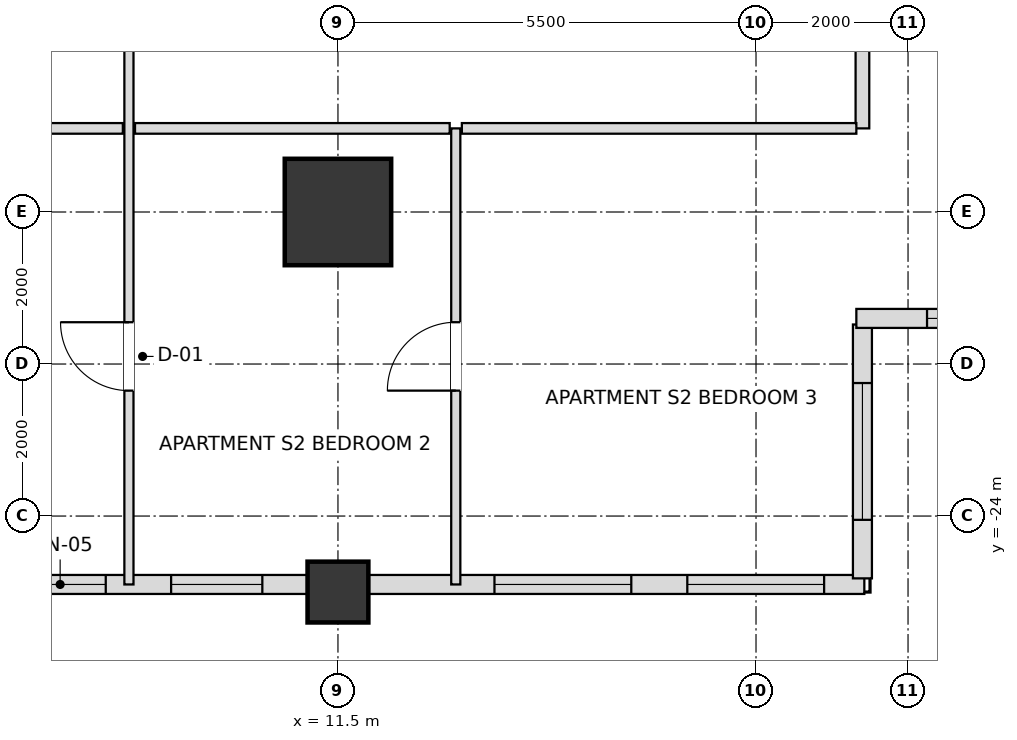
"""IFC4 building model, lengths in metres.
Left out: names, types, materials, properties, quantities, classifications, styles, units other than length and angle.
Written with IfcOpenShell. Run it as: python <this file> out.ifc"""

import sys

from ifc_helpers import new_model, si_unit, direction, frame, frame_2d, origin, origin_2d, place, context, subcontext, project, spatial, rectangle, extrude, element, fill, save


model = new_model("IFC4")
c1 = context("Model", 3, precision=1e-05, world=origin(), true_north=direction((0.0, 1.0)))
c2 = subcontext(c1, "Body", "Model", "MODEL_VIEW")
j1 = project(units=[si_unit("LENGTHUNIT", "METRE"), si_unit("PLANEANGLEUNIT", "RADIAN")], contexts=[c1])
p1 = place(None, origin())
s1 = spatial("IfcSite", under=j1, at=p1, CompositionType="ELEMENT")
p2 = place(p1, origin())
s2 = spatial("IfcBuilding", under=s1, at=p2, CompositionType="ELEMENT")
p3 = place(p2, frame((0.0, 0.0, 68.4)))
s3 = spatial("IfcBuildingStorey", under=s2, at=p3, CompositionType="ELEMENT", Elevation=68.4)
p4 = place(p3, frame((11.5, -20.0, 0.0), z_axis=(0.0, 0.0, 1.0), x_axis=(1.0, 0.0, 0.0)))
e1 = element("IfcColumn", 1, at=p4, inside=s3, PredefinedType="USERDEFINED", context=c2, shape_type="SweptSolid", body=[
    extrude(rectangle(XDim=1.4, YDim=1.4, at=origin_2d()), origin(), (0.0, 0.0, 1.0), 3.6),
])
p5 = place(p3, frame((11.5, -25.0, 0.0), z_axis=(0.0, 0.0, 1.0), x_axis=(1.0, 0.0, 0.0)))
e2 = element("IfcColumn", 2, at=p5, inside=s3, PredefinedType="COLUMN", context=c2, shape_type="SweptSolid", body=[
    extrude(rectangle(XDim=0.8, YDim=0.8, at=origin_2d()), origin(), (0.0, 0.0, 1.0), 3.6),
])
p6 = place(p3, frame((6.895, -24.9, 0.0), z_axis=(0.0, 0.0, 1.0), x_axis=(1.0, 0.0, 0.0)))
e3 = element("IfcWall", 3, at=p6, inside=s3, PredefinedType="SOLIDWALL", context=c2, shape_type="SweptSolid", body=[
    extrude(rectangle(XDim=4.21, YDim=0.25, at=frame_2d((2.105, 0.0))), origin(), (0.0, 0.0, 1.0), 2.736),
])
p7 = place(p6, frame((0.35, 0.0, 0.72)))
e4 = element("IfcOpeningElement", 4, at=p7, cuts=e3, PredefinedType="OPENING", context=c2, shape_type="SweptSolid", body=[
    extrude(rectangle(XDim=1.2, YDim=1.68, at=frame_2d((0.6, 0.84))), frame((0.0, 0.135, 0.0), z_axis=(0.0, -1.0, 0.0), x_axis=(1.0, 0.0, 0.0)), (0.0, 0.0, 1.0), 0.27),
])
p8 = place(p6, frame((2.41, 0.0, 0.72)))
e5 = element("IfcOpeningElement", 5, at=p8, cuts=e3, PredefinedType="OPENING", context=c2, shape_type="SweptSolid", body=[
    extrude(rectangle(XDim=1.2, YDim=1.68, at=frame_2d((0.6, 0.84))), frame((0.0, 0.135, 0.0), z_axis=(0.0, -1.0, 0.0), x_axis=(1.0, 0.0, 0.0)), (0.0, 0.0, 1.0), 0.27),
])
p9 = place(p3, frame((11.895, -24.9, 0.0), z_axis=(0.0, 0.0, 1.0), x_axis=(1.0, 0.0, 0.0)))
e6 = element("IfcWall", 6, at=p9, inside=s3, PredefinedType="SOLIDWALL", context=c2, shape_type="SweptSolid", body=[
    extrude(rectangle(XDim=6.53, YDim=0.25, at=frame_2d((3.265, 0.0))), origin(), (0.0, 0.0, 1.0), 2.736),
])
p10 = place(p9, frame((1.664, 0.0, 0.72)))
e7 = element("IfcOpeningElement", 7, at=p10, cuts=e6, PredefinedType="OPENING", context=c2, shape_type="SweptSolid", body=[
    extrude(rectangle(XDim=1.8, YDim=1.68, at=frame_2d((0.9, 0.84))), frame((0.0, 0.135, 0.0), z_axis=(0.0, -1.0, 0.0), x_axis=(1.0, 0.0, 0.0)), (0.0, 0.0, 1.0), 0.27),
])
p11 = place(p9, frame((4.201, 0.0, 0.72)))
e8 = element("IfcOpeningElement", 8, at=p11, cuts=e6, PredefinedType="OPENING", context=c2, shape_type="SweptSolid", body=[
    extrude(rectangle(XDim=1.8, YDim=1.68, at=frame_2d((0.9, 0.84))), frame((0.0, 0.135, 0.0), z_axis=(0.0, -1.0, 0.0), x_axis=(1.0, 0.0, 0.0)), (0.0, 0.0, 1.0), 0.27),
])
p12 = place(p3, frame((18.4, -24.82, 0.0), z_axis=(0.0, 0.0, 1.0), x_axis=(0.0, 1.0, 0.0)))
e9 = element("IfcWall", 9, at=p12, inside=s3, PredefinedType="SOLIDWALL", context=c2, shape_type="SweptSolid", body=[
    extrude(rectangle(XDim=3.34, YDim=0.25, at=frame_2d((1.67, 0.0))), origin(), (0.0, 0.0, 1.0), 2.736),
])
p13 = place(p12, frame((0.77, 0.0, 0.72)))
e10 = element("IfcOpeningElement", 10, at=p13, cuts=e9, PredefinedType="OPENING", context=c2, shape_type="SweptSolid", body=[
    extrude(rectangle(XDim=1.8, YDim=1.68, at=frame_2d((0.9, 0.84))), frame((0.0, 0.135, 0.0), z_axis=(0.0, -1.0, 0.0), x_axis=(1.0, 0.0, 0.0)), (0.0, 0.0, 1.0), 0.27),
])
p14 = place(p3, frame((18.32, -21.4, 0.0), z_axis=(0.0, 0.0, 1.0), x_axis=(1.0, 0.0, 0.0)))
e11 = element("IfcWall", 11, at=p14, inside=s3, PredefinedType="SOLIDWALL", context=c2, shape_type="SweptSolid", body=[
    extrude(rectangle(XDim=3.66, YDim=0.25, at=frame_2d((1.83, 0.0))), origin(), (0.0, 0.0, 1.0), 2.736),
])
p15 = place(p14, frame((0.93, 0.0, 0.72)))
e12 = element("IfcOpeningElement", 12, at=p15, cuts=e11, PredefinedType="OPENING", context=c2, shape_type="SweptSolid", body=[
    extrude(rectangle(XDim=1.8, YDim=1.68, at=frame_2d((0.9, 0.84))), frame((0.0, 0.135, 0.0), z_axis=(0.0, -1.0, 0.0), x_axis=(1.0, 0.0, 0.0)), (0.0, 0.0, 1.0), 0.27),
])
p16 = place(p3, frame((8.75, -24.9, 0.0), z_axis=(0.0, 0.0, 1.0), x_axis=(0.0, 1.0, 0.0)))
e13 = element("IfcWall", 13, at=p16, inside=s3, PredefinedType="PARTITIONING", context=c2, shape_type="SweptSolid", body=[
    extrude(rectangle(XDim=15.6, YDim=0.12, at=frame_2d((7.8, 0.0))), origin(), (0.0, 0.0, 1.0), 2.816),
])
p17 = place(p16, frame((10.325, 0.0, 0.0)))
e14 = element("IfcOpeningElement", 14, at=p17, cuts=e13, PredefinedType="OPENING", context=c2, shape_type="SweptSolid", body=[
    extrude(rectangle(XDim=0.95, YDim=2.1, at=frame_2d((0.475, 1.05))), frame((0.0, 0.07, 0.0), z_axis=(0.0, -1.0, 0.0), x_axis=(1.0, 0.0, 0.0)), (0.0, 0.0, 1.0), 0.14),
])
p18 = place(p16, frame((2.55, 0.0, 0.0)))
e15 = element("IfcOpeningElement", 15, at=p18, cuts=e13, PredefinedType="OPENING", context=c2, shape_type="SweptSolid", body=[
    extrude(rectangle(XDim=0.9, YDim=2.1, at=frame_2d((0.45, 1.05))), frame((0.0, 0.07, 0.0), z_axis=(0.0, -1.0, 0.0), x_axis=(1.0, 0.0, 0.0)), (0.0, 0.0, 1.0), 0.14),
])
p19 = place(p3, frame((13.05, -24.9, 0.0), z_axis=(0.0, 0.0, 1.0), x_axis=(0.0, 1.0, 0.0)))
e16 = element("IfcWall", 16, at=p19, inside=s3, PredefinedType="PARTITIONING", context=c2, shape_type="SweptSolid", body=[
    extrude(rectangle(XDim=6.0, YDim=0.12, at=frame_2d((3.0, 0.0))), origin(), (0.0, 0.0, 1.0), 2.736),
])
p20 = place(p19, frame((2.55, 0.0, 0.0)))
e17 = element("IfcOpeningElement", 17, at=p20, cuts=e16, PredefinedType="OPENING", context=c2, shape_type="SweptSolid", body=[
    extrude(rectangle(XDim=0.9, YDim=2.1, at=frame_2d((0.45, 1.05))), frame((0.0, 0.07, 0.0), z_axis=(0.0, -1.0, 0.0), x_axis=(1.0, 0.0, 0.0)), (0.0, 0.0, 1.0), 0.14),
])
p21 = place(p3, frame((18.4, -18.9, 0.0), z_axis=(0.0, 0.0, 1.0), x_axis=(0.0, 1.0, 0.0)))
e18 = element("IfcWall", 18, at=p21, inside=s3, PredefinedType="PARTITIONING", context=c2, shape_type="SweptSolid", body=[
    extrude(rectangle(XDim=9.6, YDim=0.18, at=frame_2d((4.8, 0.0))), origin(), (0.0, 0.0, 1.0), 2.736),
])
p22 = place(p3, frame((5.63, -18.9, 0.0), z_axis=(0.0, 0.0, 1.0), x_axis=(1.0, 0.0, 0.0)))
e19 = element("IfcWall", 19, at=p22, inside=s3, PredefinedType="PARTITIONING", context=c2, shape_type="SweptSolid", body=[
    extrude(rectangle(XDim=3.04, YDim=0.14, at=frame_2d((1.52, 0.0))), origin(), (0.0, 0.0, 1.0), 2.816),
])
p23 = place(p3, frame((8.83, -18.9, 0.0), z_axis=(0.0, 0.0, 1.0), x_axis=(1.0, 0.0, 0.0)))
e20 = element("IfcWall", 20, at=p23, inside=s3, PredefinedType="PARTITIONING", context=c2, shape_type="SweptSolid", body=[
    extrude(rectangle(XDim=4.14, YDim=0.14, at=frame_2d((2.07, 0.0))), origin(), (0.0, 0.0, 1.0), 2.736),
])
p24 = place(p3, frame((13.13, -18.9, 0.0), z_axis=(0.0, 0.0, 1.0), x_axis=(1.0, 0.0, 0.0)))
e21 = element("IfcWall", 21, at=p24, inside=s3, PredefinedType="PARTITIONING", context=c2, shape_type="SweptSolid", body=[
    extrude(rectangle(XDim=5.19, YDim=0.14, at=frame_2d((2.595, 0.0))), origin(), (0.0, 0.0, 1.0), 2.736),
])
p25 = place(p7, origin())
e22 = element("IfcWindow", 22, at=p25, inside=s3, PartitioningType="SINGLE_PANEL", PredefinedType="WINDOW", context=c2, shape_type="SweptSolid", body=[
    extrude(rectangle(XDim=1.2, YDim=1.68, at=frame_2d((0.6, 0.84))), frame((0.0, 0.03, 0.0), z_axis=(0.0, -1.0, 0.0), x_axis=(1.0, 0.0, 0.0)), (0.0, 0.0, 1.0), 0.06),
])
fill(e4, e22)
p26 = place(p8, origin())
e23 = element("IfcWindow", 23, at=p26, inside=s3, PartitioningType="SINGLE_PANEL", PredefinedType="WINDOW", context=c2, shape_type="SweptSolid", body=[
    extrude(rectangle(XDim=1.2, YDim=1.68, at=frame_2d((0.6, 0.84))), frame((0.0, 0.03, 0.0), z_axis=(0.0, -1.0, 0.0), x_axis=(1.0, 0.0, 0.0)), (0.0, 0.0, 1.0), 0.06),
])
fill(e5, e23)
p27 = place(p10, origin())
e24 = element("IfcWindow", 24, at=p27, inside=s3, PartitioningType="SINGLE_PANEL", PredefinedType="WINDOW", context=c2, shape_type="SweptSolid", body=[
    extrude(rectangle(XDim=1.8, YDim=1.68, at=frame_2d((0.9, 0.84))), frame((0.0, 0.03, 0.0), z_axis=(0.0, -1.0, 0.0), x_axis=(1.0, 0.0, 0.0)), (0.0, 0.0, 1.0), 0.06),
])
fill(e7, e24)
p28 = place(p11, origin())
e25 = element("IfcWindow", 25, at=p28, inside=s3, PartitioningType="SINGLE_PANEL", PredefinedType="WINDOW", context=c2, shape_type="SweptSolid", body=[
    extrude(rectangle(XDim=1.8, YDim=1.68, at=frame_2d((0.9, 0.84))), frame((0.0, 0.03, 0.0), z_axis=(0.0, -1.0, 0.0), x_axis=(1.0, 0.0, 0.0)), (0.0, 0.0, 1.0), 0.06),
])
fill(e8, e25)
p29 = place(p13, origin())
e26 = element("IfcWindow", 26, at=p29, inside=s3, PartitioningType="SINGLE_PANEL", PredefinedType="WINDOW", context=c2, shape_type="SweptSolid", body=[
    extrude(rectangle(XDim=1.8, YDim=1.68, at=frame_2d((0.9, 0.84))), frame((0.0, 0.03, 0.0), z_axis=(0.0, -1.0, 0.0), x_axis=(1.0, 0.0, 0.0)), (0.0, 0.0, 1.0), 0.06),
])
fill(e10, e26)
p30 = place(p15, origin())
e27 = element("IfcWindow", 27, at=p30, inside=s3, PartitioningType="SINGLE_PANEL", PredefinedType="WINDOW", context=c2, shape_type="SweptSolid", body=[
    extrude(rectangle(XDim=1.8, YDim=1.68, at=frame_2d((0.9, 0.84))), frame((0.0, 0.03, 0.0), z_axis=(0.0, -1.0, 0.0), x_axis=(1.0, 0.0, 0.0)), (0.0, 0.0, 1.0), 0.06),
])
fill(e12, e27)
p31 = place(p18, origin())
e28 = element("IfcDoor", 28, at=p31, inside=s3, OperationType="SINGLE_SWING_RIGHT", PredefinedType="DOOR", context=c2, shape_type="SweptSolid", body=[
    extrude(rectangle(XDim=0.9, YDim=2.1, at=frame_2d((0.45, 1.05))), frame((0.0, 0.025, 0.0), z_axis=(0.0, -1.0, 0.0), x_axis=(1.0, 0.0, 0.0)), (0.0, 0.0, 1.0), 0.05),
])
fill(e15, e28)
p32 = place(p20, origin())
e29 = element("IfcDoor", 29, at=p32, inside=s3, OperationType="SINGLE_SWING_LEFT", PredefinedType="DOOR", context=c2, shape_type="SweptSolid", body=[
    extrude(rectangle(XDim=0.9, YDim=2.1, at=frame_2d((0.45, 1.05))), frame((0.0, 0.025, 0.0), z_axis=(0.0, -1.0, 0.0), x_axis=(1.0, 0.0, 0.0)), (0.0, 0.0, 1.0), 0.05),
])
fill(e17, e29)
save(model, sys.argv[1])
